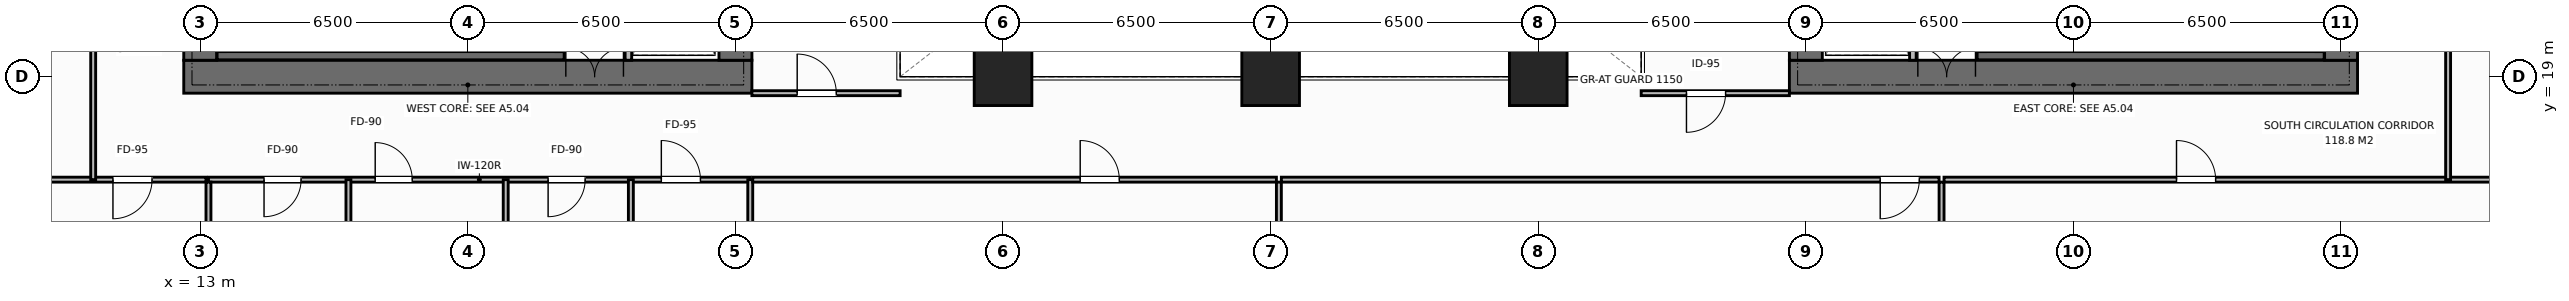
"""IFC4 building model, lengths in metres.
Left out: names, types, materials, properties, quantities, classifications, styles, units other than length and angle.
Written with IfcOpenShell. Run it as: python <this file> out.ifc"""

import sys

from ifc_helpers import new_model, si_unit, direction, frame, frame_2d, origin, origin_2d, place, context, subcontext, project, spatial, rectangle, extrude, element, fill, save


model = new_model("IFC4")
c1 = context("Model", 3, precision=1e-05, world=origin(), true_north=direction((0.0, 1.0)))
c2 = subcontext(c1, "Body", "Model", "MODEL_VIEW")
j1 = project(units=[si_unit("LENGTHUNIT", "METRE"), si_unit("PLANEANGLEUNIT", "RADIAN")], contexts=[c1])
p1 = place(None, origin())
s1 = spatial("IfcSite", under=j1, at=p1, CompositionType="ELEMENT")
p2 = place(p1, origin())
s2 = spatial("IfcBuilding", under=s1, at=p2, CompositionType="ELEMENT")
p3 = place(p2, frame((0.0, 0.0, 43.0)))
s3 = spatial("IfcBuildingStorey", under=s2, at=p3, CompositionType="ELEMENT", Elevation=43.0)
p4 = place(p3, frame((12.6, 19.0, 0.0), z_axis=(0.0, 0.0, 1.0), x_axis=(1.0, 0.0, 0.0)))
e1 = element("IfcWall", 1, at=p4, inside=s3, PredefinedType="SHEAR", context=c2, shape_type="SweptSolid", body=[
    extrude(rectangle(XDim=13.8, YDim=0.8, at=frame_2d((6.9, 0.0))), origin(), (0.0, 0.0, 1.0), 3.8),
])
p5 = place(p4, frame((9.28, 0.0, 0.0)))
e2 = element("IfcOpeningElement", 2, at=p5, cuts=e1, PredefinedType="OPENING", context=c2, shape_type="SweptSolid", body=[
    extrude(rectangle(XDim=1.4, YDim=2.2, at=frame_2d((0.7, 1.1))), frame((0.0, 0.41, 0.0), z_axis=(0.0, -1.0, 0.0), x_axis=(1.0, 0.0, 0.0)), (0.0, 0.0, 1.0), 0.82),
])
p6 = place(p3, frame((13.0, 19.4, 0.0), z_axis=(0.0, 0.0, 1.0), x_axis=(0.0, 1.0, 0.0)))
e3 = element("IfcWall", 3, at=p6, inside=s3, PredefinedType="SHEAR", context=c2, shape_type="SweptSolid", body=[
    extrude(rectangle(XDim=13.2, YDim=0.8, at=frame_2d((6.6, 0.0))), origin(), (0.0, 0.0, 1.0), 3.8),
])
p7 = place(p6, frame((4.65, 0.0, 0.0)))
e4 = element("IfcOpeningElement", 4, at=p7, cuts=e3, PredefinedType="OPENING", context=c2, shape_type="SweptSolid", body=[
    extrude(rectangle(XDim=1.4, YDim=2.2, at=frame_2d((0.7, 1.1))), frame((0.0, 0.41, 0.0), z_axis=(0.0, -1.0, 0.0), x_axis=(1.0, 0.0, 0.0)), (0.0, 0.0, 1.0), 0.82),
])
p8 = place(p3, frame((26.0, 19.4, 0.0), z_axis=(0.0, 0.0, 1.0), x_axis=(0.0, 1.0, 0.0)))
e5 = element("IfcWall", 5, at=p8, inside=s3, PredefinedType="SHEAR", context=c2, shape_type="SweptSolid", body=[
    extrude(rectangle(XDim=13.2, YDim=0.8, at=frame_2d((6.6, 0.0))), origin(), (0.0, 0.0, 1.0), 3.8),
])
p9 = place(p3, frame((51.6, 19.0, 0.0), z_axis=(0.0, 0.0, 1.0), x_axis=(1.0, 0.0, 0.0)))
e6 = element("IfcWall", 6, at=p9, inside=s3, PredefinedType="SHEAR", context=c2, shape_type="SweptSolid", body=[
    extrude(rectangle(XDim=13.8, YDim=0.8, at=frame_2d((6.9, 0.0))), origin(), (0.0, 0.0, 1.0), 3.8),
])
p10 = place(p9, frame((3.12, 0.0, 0.0)))
e7 = element("IfcOpeningElement", 7, at=p10, cuts=e6, PredefinedType="OPENING", context=c2, shape_type="SweptSolid", body=[
    extrude(rectangle(XDim=1.4, YDim=2.2, at=frame_2d((0.7, 1.1))), frame((0.0, 0.41, 0.0), z_axis=(0.0, -1.0, 0.0), x_axis=(1.0, 0.0, 0.0)), (0.0, 0.0, 1.0), 0.82),
])
p11 = place(p3, frame((52.0, 19.4, 0.0), z_axis=(0.0, 0.0, 1.0), x_axis=(0.0, 1.0, 0.0)))
e8 = element("IfcWall", 8, at=p11, inside=s3, PredefinedType="SHEAR", context=c2, shape_type="SweptSolid", body=[
    extrude(rectangle(XDim=13.2, YDim=0.8, at=frame_2d((6.6, 0.0))), origin(), (0.0, 0.0, 1.0), 3.8),
])
p12 = place(p3, frame((65.0, 19.4, 0.0), z_axis=(0.0, 0.0, 1.0), x_axis=(0.0, 1.0, 0.0)))
e9 = element("IfcWall", 9, at=p12, inside=s3, PredefinedType="SHEAR", context=c2, shape_type="SweptSolid", body=[
    extrude(rectangle(XDim=13.2, YDim=0.8, at=frame_2d((6.6, 0.0))), origin(), (0.0, 0.0, 1.0), 3.8),
])
p13 = place(p12, frame((8.05, 0.0, 0.0)))
e10 = element("IfcOpeningElement", 10, at=p13, cuts=e9, PredefinedType="OPENING", context=c2, shape_type="SweptSolid", body=[
    extrude(rectangle(XDim=1.3, YDim=2.2, at=frame_2d((0.65, 1.1))), frame((0.0, 0.41, 0.0), z_axis=(0.0, -1.0, 0.0), x_axis=(1.0, 0.0, 0.0)), (0.0, 0.0, 1.0), 0.82),
])
for number, where, z_axis, x_axis in (
    (11, (13.41, 19.51, 0.0), (0.0, 0.0, 1.0), (1.0, 0.0, 0.0)),
    (12, (56.16, 19.51, 0.0), (0.0, 0.0, 1.0), (1.0, 0.0, 0.0)),
):
    element("IfcWall", number, at=place(p3, frame(where, z_axis=z_axis, x_axis=x_axis)), inside=s3, PredefinedType="SHEAR", context=c2, shape_type="SweptSolid", body=[
        extrude(rectangle(XDim=8.43, YDim=0.2, at=frame_2d((4.215, 0.0))), origin(), (0.0, 0.0, 1.0), 3.8),
    ])
for number, where, z_axis, x_axis in (
    (13, (32.5, 19.0, 0.0), (0.0, 0.0, 1.0), (1.0, 0.0, 0.0)),
    (14, (39.0, 19.0, 0.0), (0.0, 0.0, 1.0), (1.0, 0.0, 0.0)),
    (15, (45.5, 19.0, 0.0), (0.0, 0.0, 1.0), (1.0, 0.0, 0.0)),
):
    element("IfcColumn", number, at=place(p3, frame(where, z_axis=z_axis, x_axis=x_axis)), inside=s3, PredefinedType="COLUMN", context=c2, shape_type="SweptSolid", body=[
        extrude(rectangle(XDim=1.4, YDim=1.4, at=origin_2d()), origin(), (0.0, 0.0, 1.0), 3.8),
    ])
p14 = place(p3, frame((23.4, 19.4, 0.0), z_axis=(0.0, 0.0, 1.0), x_axis=(0.0, 1.0, 0.0)))
e16 = element("IfcWall", 16, at=p14, inside=s3, PredefinedType="STANDARD", context=c2, shape_type="SweptSolid", body=[
    extrude(rectangle(XDim=13.2, YDim=0.16, at=frame_2d((6.6, 0.0))), origin(), (0.0, 0.0, 1.0), 3.55),
])
p15 = place(p14, frame((0.55, 0.0, 0.0)))
e17 = element("IfcOpeningElement", 17, at=p15, cuts=e16, PredefinedType="OPENING", context=c2, shape_type="SweptSolid", body=[
    extrude(rectangle(XDim=1.1, YDim=2.2, at=frame_2d((0.55, 1.1))), frame((0.0, 0.09, 0.0), z_axis=(0.0, -1.0, 0.0), x_axis=(1.0, 0.0, 0.0)), (0.0, 0.0, 1.0), 0.18),
])
p16 = place(p14, frame((2.7, 0.0, 0.0)))
e18 = element("IfcOpeningElement", 18, at=p16, cuts=e16, PredefinedType="OPENING", context=c2, shape_type="SweptSolid", body=[
    extrude(rectangle(XDim=1.1, YDim=2.2, at=frame_2d((0.55, 1.1))), frame((0.0, 0.09, 0.0), z_axis=(0.0, -1.0, 0.0), x_axis=(1.0, 0.0, 0.0)), (0.0, 0.0, 1.0), 0.18),
])
p17 = place(p3, frame((54.6, 19.4, 0.0), z_axis=(0.0, 0.0, 1.0), x_axis=(0.0, 1.0, 0.0)))
e19 = element("IfcWall", 19, at=p17, inside=s3, PredefinedType="STANDARD", context=c2, shape_type="SweptSolid", body=[
    extrude(rectangle(XDim=13.2, YDim=0.16, at=frame_2d((6.6, 0.0))), origin(), (0.0, 0.0, 1.0), 3.55),
])
p18 = place(p17, frame((0.55, 0.0, 0.0)))
e20 = element("IfcOpeningElement", 20, at=p18, cuts=e19, PredefinedType="OPENING", context=c2, shape_type="SweptSolid", body=[
    extrude(rectangle(XDim=1.1, YDim=2.2, at=frame_2d((0.55, 1.1))), frame((0.0, 0.09, 0.0), z_axis=(0.0, -1.0, 0.0), x_axis=(1.0, 0.0, 0.0)), (0.0, 0.0, 1.0), 0.18),
])
p19 = place(p17, frame((2.7, 0.0, 0.0)))
e21 = element("IfcOpeningElement", 21, at=p19, cuts=e19, PredefinedType="OPENING", context=c2, shape_type="SweptSolid", body=[
    extrude(rectangle(XDim=1.1, YDim=2.2, at=frame_2d((0.55, 1.1))), frame((0.0, 0.09, 0.0), z_axis=(0.0, -1.0, 0.0), x_axis=(1.0, 0.0, 0.0)), (0.0, 0.0, 1.0), 0.18),
])
p20 = place(p3, frame((26.4, 18.6, 0.0), z_axis=(0.0, 0.0, 1.0), x_axis=(1.0, 0.0, 0.0)))
e22 = element("IfcWall", 22, at=p20, inside=s3, PredefinedType="PARTITIONING", context=c2, shape_type="SweptSolid", body=[
    extrude(rectangle(XDim=3.6, YDim=0.12, at=frame_2d((1.8, 0.0))), origin(), (0.0, 0.0, 1.0), 3.55),
])
p21 = place(p20, frame((1.1, 0.0, 0.0)))
e23 = element("IfcOpeningElement", 23, at=p21, cuts=e22, PredefinedType="OPENING", context=c2, shape_type="SweptSolid", body=[
    extrude(rectangle(XDim=0.95, YDim=2.15, at=frame_2d((0.475, 1.075))), frame((0.0, 0.07, 0.0), z_axis=(0.0, -1.0, 0.0), x_axis=(1.0, 0.0, 0.0)), (0.0, 0.0, 1.0), 0.14),
])
p22 = place(p3, frame((48.0, 18.6, 0.0), z_axis=(0.0, 0.0, 1.0), x_axis=(1.0, 0.0, 0.0)))
e24 = element("IfcWall", 24, at=p22, inside=s3, PredefinedType="PARTITIONING", context=c2, shape_type="SweptSolid", body=[
    extrude(rectangle(XDim=3.6, YDim=0.12, at=frame_2d((1.8, 0.0))), origin(), (0.0, 0.0, 1.0), 3.55),
])
p23 = place(p22, frame((1.1, 0.0, 0.0)))
e25 = element("IfcOpeningElement", 25, at=p23, cuts=e24, PredefinedType="OPENING", context=c2, shape_type="SweptSolid", body=[
    extrude(rectangle(XDim=0.95, YDim=2.15, at=frame_2d((0.475, 1.075))), frame((0.0, 0.07, 0.0), z_axis=(0.0, -1.0, 0.0), x_axis=(1.0, 0.0, 0.0)), (0.0, 0.0, 1.0), 0.14),
])
p24 = place(p3, frame((13.2, 16.5, 0.0), z_axis=(0.0, 0.0, 1.0), x_axis=(1.0, 0.0, 0.0)))
e26 = element("IfcWall", 26, at=p24, inside=s3, PredefinedType="PARTITIONING", context=c2, shape_type="SweptSolid", body=[
    extrude(rectangle(XDim=13.16, YDim=0.12, at=frame_2d((6.58, 0.0))), origin(), (0.0, 0.0, 1.0), 3.55),
])
p25 = place(p24, frame((1.35, 0.0, 0.0)))
e27 = element("IfcOpeningElement", 27, at=p25, cuts=e26, PredefinedType="OPENING", context=c2, shape_type="SweptSolid", body=[
    extrude(rectangle(XDim=0.9, YDim=2.15, at=frame_2d((0.45, 1.075))), frame((0.0, 0.07, 0.0), z_axis=(0.0, -1.0, 0.0), x_axis=(1.0, 0.0, 0.0)), (0.0, 0.0, 1.0), 0.14),
])
p26 = place(p24, frame((4.05, 0.0, 0.0)))
e28 = element("IfcOpeningElement", 28, at=p26, cuts=e26, PredefinedType="OPENING", context=c2, shape_type="SweptSolid", body=[
    extrude(rectangle(XDim=0.9, YDim=2.15, at=frame_2d((0.45, 1.075))), frame((0.0, 0.07, 0.0), z_axis=(0.0, -1.0, 0.0), x_axis=(1.0, 0.0, 0.0)), (0.0, 0.0, 1.0), 0.14),
])
p27 = place(p24, frame((8.25, 0.0, 0.0)))
e29 = element("IfcOpeningElement", 29, at=p27, cuts=e26, PredefinedType="OPENING", context=c2, shape_type="SweptSolid", body=[
    extrude(rectangle(XDim=0.9, YDim=2.15, at=frame_2d((0.45, 1.075))), frame((0.0, 0.07, 0.0), z_axis=(0.0, -1.0, 0.0), x_axis=(1.0, 0.0, 0.0)), (0.0, 0.0, 1.0), 0.14),
])
p28 = place(p24, frame((11.0, 0.0, 0.0)))
e30 = element("IfcOpeningElement", 30, at=p28, cuts=e26, PredefinedType="OPENING", context=c2, shape_type="SweptSolid", body=[
    extrude(rectangle(XDim=0.95, YDim=2.15, at=frame_2d((0.475, 1.075))), frame((0.0, 0.07, 0.0), z_axis=(0.0, -1.0, 0.0), x_axis=(1.0, 0.0, 0.0)), (0.0, 0.0, 1.0), 0.14),
])
for number, where, z_axis, x_axis in (
    (31, (16.6, 13.82, 0.0), (0.0, 0.0, 1.0), (0.0, 1.0, 0.0)),
    (32, (20.42, 13.82, 0.0), (0.0, 0.0, 1.0), (0.0, 1.0, 0.0)),
    (33, (23.46, 13.82, 0.0), (0.0, 0.0, 1.0), (0.0, 1.0, 0.0)),
    (34, (26.36, 13.82, 0.0), (0.0, 0.0, 1.0), (0.0, 1.0, 0.0)),
):
    element("IfcWall", number, at=place(p3, frame(where, z_axis=z_axis, x_axis=x_axis)), inside=s3, PredefinedType="PARTITIONING", context=c2, shape_type="SweptSolid", body=[
        extrude(rectangle(XDim=2.68, YDim=0.12, at=frame_2d((1.34, 0.0))), origin(), (0.0, 0.0, 1.0), 3.55),
    ])
p29 = place(p3, frame((13.2, 0.02, 0.0), z_axis=(0.0, 0.0, 1.0), x_axis=(0.0, 1.0, 0.0)))
e35 = element("IfcWall", 35, at=p29, inside=s3, PredefinedType="PARTITIONING", context=c2, shape_type="SweptSolid", body=[
    extrude(rectangle(XDim=16.42, YDim=0.12, at=frame_2d((8.21, 0.0))), origin(), (0.0, 0.0, 1.0), 2.9),
])
p30 = place(p3, frame((-0.02, 16.5, 0.0), z_axis=(0.0, 0.0, 1.0), x_axis=(1.0, 0.0, 0.0)))
e36 = element("IfcWall", 36, at=p30, inside=s3, PredefinedType="PARTITIONING", context=c2, shape_type="SweptSolid", body=[
    extrude(rectangle(XDim=13.16, YDim=0.12, at=frame_2d((6.58, 0.0))), origin(), (0.0, 0.0, 1.0), 3.55),
])
p31 = place(p30, frame((10.9, 0.0, 0.0)))
e37 = element("IfcOpeningElement", 37, at=p31, cuts=e36, PredefinedType="OPENING", context=c2, shape_type="SweptSolid", body=[
    extrude(rectangle(XDim=0.95, YDim=2.15, at=frame_2d((0.475, 1.075))), frame((0.0, 0.07, 0.0), z_axis=(0.0, -1.0, 0.0), x_axis=(1.0, 0.0, 0.0)), (0.0, 0.0, 1.0), 0.14),
])
p32 = place(p3, frame((39.2, 0.02, 0.0), z_axis=(0.0, 0.0, 1.0), x_axis=(0.0, 1.0, 0.0)))
e38 = element("IfcWall", 38, at=p32, inside=s3, PredefinedType="PARTITIONING", context=c2, shape_type="SweptSolid", body=[
    extrude(rectangle(XDim=16.42, YDim=0.12, at=frame_2d((8.21, 0.0))), origin(), (0.0, 0.0, 1.0), 2.9),
])
p33 = place(p3, frame((26.42, 16.5, 0.0), z_axis=(0.0, 0.0, 1.0), x_axis=(1.0, 0.0, 0.0)))
e39 = element("IfcWall", 39, at=p33, inside=s3, PredefinedType="PARTITIONING", context=c2, shape_type="SweptSolid", body=[
    extrude(rectangle(XDim=12.72, YDim=0.12, at=frame_2d((6.36, 0.0))), origin(), (0.0, 0.0, 1.0), 3.55),
])
p34 = place(p33, frame((7.954, 0.0, 0.0)))
e40 = element("IfcOpeningElement", 40, at=p34, cuts=e39, PredefinedType="OPENING", context=c2, shape_type="SweptSolid", body=[
    extrude(rectangle(XDim=0.95, YDim=2.15, at=frame_2d((0.475, 1.075))), frame((0.0, 0.07, 0.0), z_axis=(0.0, -1.0, 0.0), x_axis=(1.0, 0.0, 0.0)), (0.0, 0.0, 1.0), 0.14),
])
p35 = place(p3, frame((55.296, 0.02, 0.0), z_axis=(0.0, 0.0, 1.0), x_axis=(0.0, 1.0, 0.0)))
e41 = element("IfcWall", 41, at=p35, inside=s3, PredefinedType="PARTITIONING", context=c2, shape_type="SweptSolid", body=[
    extrude(rectangle(XDim=16.42, YDim=0.12, at=frame_2d((8.21, 0.0))), origin(), (0.0, 0.0, 1.0), 3.55),
])
p36 = place(p3, frame((39.26, 16.5, 0.0), z_axis=(0.0, 0.0, 1.0), x_axis=(1.0, 0.0, 0.0)))
e42 = element("IfcWall", 42, at=p36, inside=s3, PredefinedType="PARTITIONING", context=c2, shape_type="SweptSolid", body=[
    extrude(rectangle(XDim=15.976, YDim=0.12, at=frame_2d((7.988, 0.0))), origin(), (0.0, 0.0, 1.0), 3.55),
])
p37 = place(p36, frame((14.546, 0.0, 0.0)))
e43 = element("IfcOpeningElement", 43, at=p37, cuts=e42, PredefinedType="OPENING", context=c2, shape_type="SweptSolid", body=[
    extrude(rectangle(XDim=0.95, YDim=2.15, at=frame_2d((0.475, 1.075))), frame((0.0, 0.07, 0.0), z_axis=(0.0, -1.0, 0.0), x_axis=(1.0, 0.0, 0.0)), (0.0, 0.0, 1.0), 0.14),
])
p38 = place(p3, frame((55.356, 16.5, 0.0), z_axis=(0.0, 0.0, 1.0), x_axis=(1.0, 0.0, 0.0)))
e44 = element("IfcWall", 44, at=p38, inside=s3, PredefinedType="PARTITIONING", context=c2, shape_type="SweptSolid", body=[
    extrude(rectangle(XDim=22.664, YDim=0.12, at=frame_2d((11.332, 0.0))), origin(), (0.0, 0.0, 1.0), 3.55),
])
p39 = place(p38, frame((5.647, 0.0, 0.0)))
e45 = element("IfcOpeningElement", 45, at=p39, cuts=e44, PredefinedType="OPENING", context=c2, shape_type="SweptSolid", body=[
    extrude(rectangle(XDim=0.95, YDim=2.15, at=frame_2d((0.475, 1.075))), frame((0.0, 0.07, 0.0), z_axis=(0.0, -1.0, 0.0), x_axis=(1.0, 0.0, 0.0)), (0.0, 0.0, 1.0), 0.14),
])
p40 = place(p3, frame((10.4, 16.5, 0.0), z_axis=(0.0, 0.0, 1.0), x_axis=(0.0, 1.0, 0.0)))
e46 = element("IfcWall", 46, at=p40, inside=s3, PredefinedType="PARTITIONING", context=c2, shape_type="SweptSolid", body=[
    extrude(rectangle(XDim=9.5, YDim=0.12, at=frame_2d((4.75, 0.0))), origin(), (0.0, 0.0, 1.0), 3.55),
])
p41 = place(p40, frame((5.325, 0.0, 0.0)))
e47 = element("IfcOpeningElement", 47, at=p41, cuts=e46, PredefinedType="OPENING", context=c2, shape_type="SweptSolid", body=[
    extrude(rectangle(XDim=0.95, YDim=2.15, at=frame_2d((0.475, 1.075))), frame((0.0, 0.07, 0.0), z_axis=(0.0, -1.0, 0.0), x_axis=(1.0, 0.0, 0.0)), (0.0, 0.0, 1.0), 0.14),
])
p42 = place(p3, frame((67.6, 16.5, 0.0), z_axis=(0.0, 0.0, 1.0), x_axis=(0.0, 1.0, 0.0)))
e48 = element("IfcWall", 48, at=p42, inside=s3, PredefinedType="PARTITIONING", context=c2, shape_type="SweptSolid", body=[
    extrude(rectangle(XDim=19.0, YDim=0.12, at=frame_2d((9.5, 0.0))), origin(), (0.0, 0.0, 1.0), 3.55),
])
p43 = place(p42, frame((9.025, 0.0, 0.0)))
e49 = element("IfcOpeningElement", 49, at=p43, cuts=e48, PredefinedType="OPENING", context=c2, shape_type="SweptSolid", body=[
    extrude(rectangle(XDim=0.95, YDim=2.15, at=frame_2d((0.475, 1.075))), frame((0.0, 0.07, 0.0), z_axis=(0.0, -1.0, 0.0), x_axis=(1.0, 0.0, 0.0)), (0.0, 0.0, 1.0), 0.14),
])
p44 = place(p5, origin())
e50 = element("IfcDoor", 50, at=p44, inside=s3, OperationType="DOUBLE_DOOR_SINGLE_SWING", PredefinedType="DOOR", context=c2, shape_type="SweptSolid", body=[
    extrude(rectangle(XDim=1.4, YDim=2.2, at=frame_2d((0.7, 1.1))), frame((0.0, 0.125, 0.0), z_axis=(0.0, -1.0, 0.0), x_axis=(1.0, 0.0, 0.0)), (0.0, 0.0, 1.0), 0.05),
])
fill(e2, e50)
p45 = place(p10, origin())
e51 = element("IfcDoor", 51, at=p45, inside=s3, OperationType="DOUBLE_DOOR_SINGLE_SWING", PredefinedType="DOOR", context=c2, shape_type="SweptSolid", body=[
    extrude(rectangle(XDim=1.4, YDim=2.2, at=frame_2d((0.7, 1.1))), frame((0.0, 0.125, 0.0), z_axis=(0.0, -1.0, 0.0), x_axis=(1.0, 0.0, 0.0)), (0.0, 0.0, 1.0), 0.05),
])
fill(e7, e51)
p46 = place(p21, origin())
e52 = element("IfcDoor", 52, at=p46, inside=s3, OperationType="SINGLE_SWING_LEFT", PredefinedType="DOOR", context=c2, shape_type="SweptSolid", body=[
    extrude(rectangle(XDim=0.95, YDim=2.15, at=frame_2d((0.475, 1.075))), frame((0.0, 0.025, 0.0), z_axis=(0.0, -1.0, 0.0), x_axis=(1.0, 0.0, 0.0)), (0.0, 0.0, 1.0), 0.05),
])
fill(e23, e52)
p47 = place(p23, origin())
e53 = element("IfcDoor", 53, at=p47, inside=s3, OperationType="SINGLE_SWING_RIGHT", PredefinedType="DOOR", context=c2, shape_type="SweptSolid", body=[
    extrude(rectangle(XDim=0.95, YDim=2.15, at=frame_2d((0.475, 1.075))), frame((0.0, 0.025, 0.0), z_axis=(0.0, -1.0, 0.0), x_axis=(1.0, 0.0, 0.0)), (0.0, 0.0, 1.0), 0.05),
])
fill(e25, e53)
p48 = place(p25, origin())
e54 = element("IfcDoor", 54, at=p48, inside=s3, OperationType="SINGLE_SWING_RIGHT", PredefinedType="DOOR", context=c2, shape_type="SweptSolid", body=[
    extrude(rectangle(XDim=0.9, YDim=2.15, at=frame_2d((0.45, 1.075))), frame((0.0, 0.025, 0.0), z_axis=(0.0, -1.0, 0.0), x_axis=(1.0, 0.0, 0.0)), (0.0, 0.0, 1.0), 0.05),
])
fill(e27, e54)
p49 = place(p26, origin())
e55 = element("IfcDoor", 55, at=p49, inside=s3, OperationType="SINGLE_SWING_LEFT", PredefinedType="DOOR", context=c2, shape_type="SweptSolid", body=[
    extrude(rectangle(XDim=0.9, YDim=2.15, at=frame_2d((0.45, 1.075))), frame((0.0, 0.025, 0.0), z_axis=(0.0, -1.0, 0.0), x_axis=(1.0, 0.0, 0.0)), (0.0, 0.0, 1.0), 0.05),
])
fill(e28, e55)
p50 = place(p27, origin())
e56 = element("IfcDoor", 56, at=p50, inside=s3, OperationType="SINGLE_SWING_RIGHT", PredefinedType="DOOR", context=c2, shape_type="SweptSolid", body=[
    extrude(rectangle(XDim=0.9, YDim=2.15, at=frame_2d((0.45, 1.075))), frame((0.0, 0.025, 0.0), z_axis=(0.0, -1.0, 0.0), x_axis=(1.0, 0.0, 0.0)), (0.0, 0.0, 1.0), 0.05),
])
fill(e29, e56)
p51 = place(p28, origin())
e57 = element("IfcDoor", 57, at=p51, inside=s3, OperationType="SINGLE_SWING_LEFT", PredefinedType="DOOR", context=c2, shape_type="SweptSolid", body=[
    extrude(rectangle(XDim=0.95, YDim=2.15, at=frame_2d((0.475, 1.075))), frame((0.0, 0.025, 0.0), z_axis=(0.0, -1.0, 0.0), x_axis=(1.0, 0.0, 0.0)), (0.0, 0.0, 1.0), 0.05),
])
fill(e30, e57)
p52 = place(p31, origin())
e58 = element("IfcDoor", 58, at=p52, inside=s3, OperationType="SINGLE_SWING_RIGHT", PredefinedType="DOOR", context=c2, shape_type="SweptSolid", body=[
    extrude(rectangle(XDim=0.95, YDim=2.15, at=frame_2d((0.475, 1.075))), frame((0.0, 0.025, 0.0), z_axis=(0.0, -1.0, 0.0), x_axis=(1.0, 0.0, 0.0)), (0.0, 0.0, 1.0), 0.05),
])
fill(e37, e58)
p53 = place(p34, origin())
e59 = element("IfcDoor", 59, at=p53, inside=s3, OperationType="SINGLE_SWING_LEFT", PredefinedType="DOOR", context=c2, shape_type="SweptSolid", body=[
    extrude(rectangle(XDim=0.95, YDim=2.15, at=frame_2d((0.475, 1.075))), frame((0.0, 0.025, 0.0), z_axis=(0.0, -1.0, 0.0), x_axis=(1.0, 0.0, 0.0)), (0.0, 0.0, 1.0), 0.05),
])
fill(e40, e59)
p54 = place(p37, origin())
e60 = element("IfcDoor", 60, at=p54, inside=s3, OperationType="SINGLE_SWING_RIGHT", PredefinedType="DOOR", context=c2, shape_type="SweptSolid", body=[
    extrude(rectangle(XDim=0.95, YDim=2.15, at=frame_2d((0.475, 1.075))), frame((0.0, 0.025, 0.0), z_axis=(0.0, -1.0, 0.0), x_axis=(1.0, 0.0, 0.0)), (0.0, 0.0, 1.0), 0.05),
])
fill(e43, e60)
p55 = place(p39, origin())
e61 = element("IfcDoor", 61, at=p55, inside=s3, OperationType="SINGLE_SWING_LEFT", PredefinedType="DOOR", context=c2, shape_type="SweptSolid", body=[
    extrude(rectangle(XDim=0.95, YDim=2.15, at=frame_2d((0.475, 1.075))), frame((0.0, 0.025, 0.0), z_axis=(0.0, -1.0, 0.0), x_axis=(1.0, 0.0, 0.0)), (0.0, 0.0, 1.0), 0.05),
])
fill(e45, e61)
save(model, sys.argv[1])
